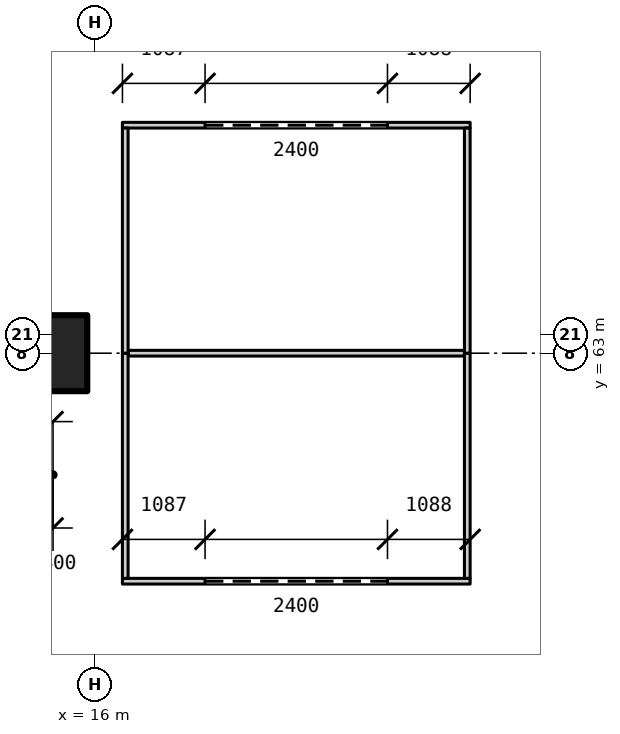
"""IFC4 building model, lengths in metres.
Left out: names, types, materials, properties, quantities, classifications, styles, units other than length and angle.
Written with IfcOpenShell. Run it as: python <this file> out.ifc"""

import sys

from ifc_helpers import new_model, si_unit, direction, frame, frame_2d, origin, origin_2d, place, context, subcontext, project, spatial, rectangle, extrude, element, fill, save


model = new_model("IFC4")
c1 = context("Model", 3, precision=1e-05, world=origin(), true_north=direction((0.0, 1.0)))
c2 = subcontext(c1, "Body", "Model", "MODEL_VIEW")
j1 = project(units=[si_unit("LENGTHUNIT", "METRE"), si_unit("PLANEANGLEUNIT", "RADIAN")], contexts=[c1])
p1 = place(None, origin())
s1 = spatial("IfcSite", under=j1, at=p1, CompositionType="ELEMENT")
p2 = place(p1, origin())
s2 = spatial("IfcBuilding", under=s1, at=p2, CompositionType="ELEMENT")
p3 = place(p2, origin())
s3 = spatial("IfcBuildingStorey", under=s2, at=p3, CompositionType="ELEMENT", Elevation=0.0)
p4 = place(p3, frame((15.0, 63.0, 0.0), z_axis=(0.0, 0.0, 1.0), x_axis=(1.0, 0.0, 0.0)))
e1 = element("IfcColumn", 1, at=p4, inside=s3, PredefinedType="COLUMN", context=c2, shape_type="SweptSolid", body=[
    extrude(rectangle(XDim=1.8, YDim=1.0, at=origin_2d()), origin(), (0.0, 0.0, 1.0), 6.0),
])
p5 = place(p3, frame((16.363, 60.0, 0.0), z_axis=(0.0, 0.0, 1.0), x_axis=(1.0, 0.0, 0.0)))
e2 = element("IfcWall", 2, at=p5, inside=s3, PredefinedType="PARTITIONING", context=c2, shape_type="SweptSolid", body=[
    extrude(rectangle(XDim=4.575, YDim=0.075, at=frame_2d((2.288, 0.0))), origin(), (0.0, 0.0, 1.0), 3.0),
])
p6 = place(p5, frame((1.087, 0.0, 0.0)))
e3 = element("IfcOpeningElement", 3, at=p6, cuts=e2, PredefinedType="OPENING", context=c2, shape_type="SweptSolid", body=[
    extrude(rectangle(XDim=2.4, YDim=2.4, at=frame_2d((1.2, 1.2))), frame((0.0, 0.047, 0.0), z_axis=(0.0, -1.0, 0.0), x_axis=(1.0, 0.0, 0.0)), (0.0, 0.0, 1.0), 0.095),
])
p7 = place(p3, frame((16.438, 63.0, 0.0), z_axis=(0.0, 0.0, 1.0), x_axis=(1.0, 0.0, 0.0)))
e4 = element("IfcWall", 4, at=p7, inside=s3, PredefinedType="PARTITIONING", context=c2, shape_type="SweptSolid", body=[
    extrude(rectangle(XDim=4.425, YDim=0.075, at=frame_2d((2.212, 0.0))), origin(), (0.0, 0.0, 1.0), 3.0),
])
p8 = place(p3, frame((16.363, 66.0, 0.0), z_axis=(0.0, 0.0, 1.0), x_axis=(1.0, 0.0, 0.0)))
e5 = element("IfcWall", 5, at=p8, inside=s3, PredefinedType="PARTITIONING", context=c2, shape_type="SweptSolid", body=[
    extrude(rectangle(XDim=4.575, YDim=0.075, at=frame_2d((2.288, 0.0))), origin(), (0.0, 0.0, 1.0), 3.0),
])
p9 = place(p8, frame((1.087, 0.0, 0.0)))
e6 = element("IfcOpeningElement", 6, at=p9, cuts=e5, PredefinedType="OPENING", context=c2, shape_type="SweptSolid", body=[
    extrude(rectangle(XDim=2.4, YDim=2.4, at=frame_2d((1.2, 1.2))), frame((0.0, 0.047, 0.0), z_axis=(0.0, -1.0, 0.0), x_axis=(1.0, 0.0, 0.0)), (0.0, 0.0, 1.0), 0.095),
])
for number, where, z_axis, x_axis in (
    (7, (16.4, 60.038, 0.0), (0.0, 0.0, 1.0), (0.0, 1.0, 0.0)),
    (8, (16.4, 63.0, 0.0), (0.0, 0.0, 1.0), (0.0, 1.0, 0.0)),
    (9, (20.9, 60.038, 0.0), (0.0, 0.0, 1.0), (0.0, 1.0, 0.0)),
    (10, (20.9, 63.0, 0.0), (0.0, 0.0, 1.0), (0.0, 1.0, 0.0)),
):
    element("IfcWall", number, at=place(p3, frame(where, z_axis=z_axis, x_axis=x_axis)), inside=s3, PredefinedType="PARTITIONING", context=c2, shape_type="SweptSolid", body=[
        extrude(rectangle(XDim=2.962, YDim=0.075, at=frame_2d((1.481, 0.0))), origin(), (0.0, 0.0, 1.0), 3.0),
    ])
p10 = place(p6, origin())
e11 = element("IfcDoor", 11, at=p10, inside=s3, OperationType="ROLLINGUP", PredefinedType="DOOR", context=c2, shape_type="SweptSolid", body=[
    extrude(rectangle(XDim=2.4, YDim=2.4, at=frame_2d((1.2, 1.2))), frame((0.0, 0.025, 0.0), z_axis=(0.0, -1.0, 0.0), x_axis=(1.0, 0.0, 0.0)), (0.0, 0.0, 1.0), 0.05),
])
fill(e3, e11)
p11 = place(p9, origin())
e12 = element("IfcDoor", 12, at=p11, inside=s3, OperationType="ROLLINGUP", PredefinedType="DOOR", context=c2, shape_type="SweptSolid", body=[
    extrude(rectangle(XDim=2.4, YDim=2.4, at=frame_2d((1.2, 1.2))), frame((0.0, 0.025, 0.0), z_axis=(0.0, -1.0, 0.0), x_axis=(1.0, 0.0, 0.0)), (0.0, 0.0, 1.0), 0.05),
])
fill(e6, e12)
save(model, sys.argv[1])
